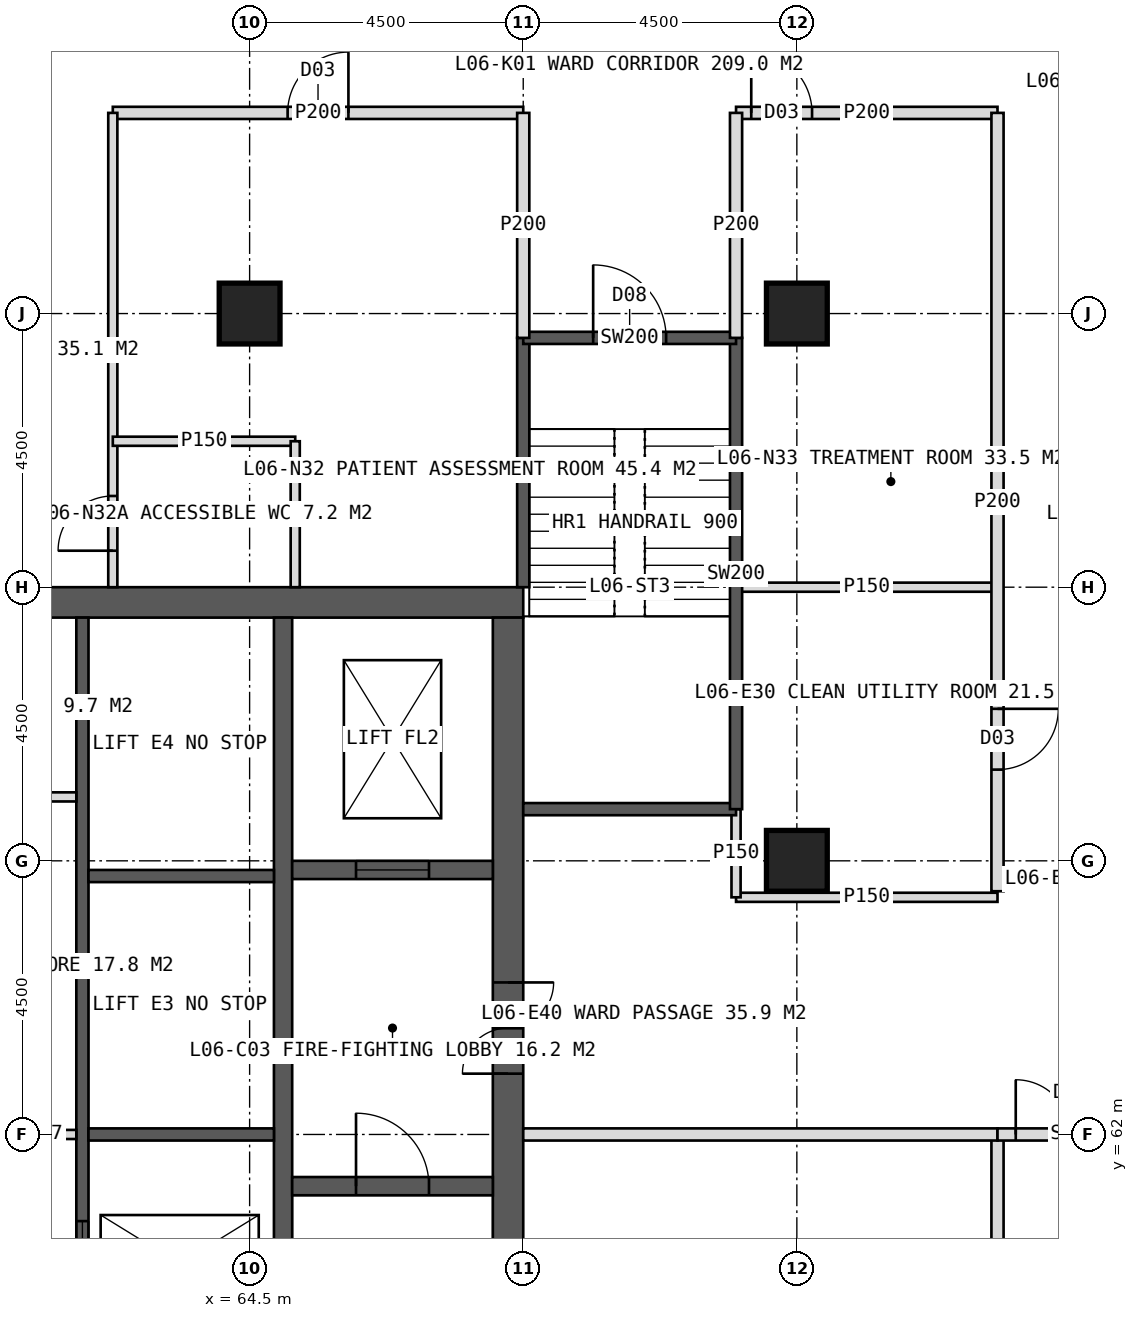
"""IFC4 building model, lengths in metres.
Left out: names, types, materials, properties, quantities, classifications, styles, units other than length and angle.
Written with IfcOpenShell. Run it as: python <this file> out.ifc"""

import sys

from ifc_helpers import new_model, si_unit, direction, frame, frame_2d, origin, origin_2d, place, context, subcontext, project, spatial, rectangle, hollow_rectangle, extrude, element, fill, save


model = new_model("IFC4")
c1 = context("Model", 3, precision=1e-05, world=origin(), true_north=direction((0.0, 1.0)))
c2 = subcontext(c1, "Body", "Model", "MODEL_VIEW")
j1 = project(units=[si_unit("LENGTHUNIT", "METRE"), si_unit("PLANEANGLEUNIT", "RADIAN")], contexts=[c1])
p1 = place(None, origin())
s1 = spatial("IfcSite", under=j1, at=p1, CompositionType="ELEMENT")
p2 = place(p1, origin())
s2 = spatial("IfcBuilding", under=s1, at=p2, CompositionType="ELEMENT")
p3 = place(p2, frame((0.0, 0.0, 31.0)))
s3 = spatial("IfcBuildingStorey", under=s2, at=p3, CompositionType="ELEMENT", Elevation=31.0)
p4 = place(p3, frame((51.0, 70.75, 0.0), z_axis=(0.0, 0.0, 1.0), x_axis=(1.0, 0.0, 0.0)))
e1 = element("IfcWall", 1, at=p4, inside=s3, PredefinedType="SHEAR", context=c2, shape_type="SweptSolid", body=[
    extrude(rectangle(XDim=18.0, YDim=0.5, at=frame_2d((9.0, 0.0))), origin(), (0.0, 0.0, 1.0), 4.0),
])
p5 = place(p4, frame((8.1, 0.0, 0.0)))
e2 = element("IfcOpeningElement", 2, at=p5, cuts=e1, PredefinedType="OPENING", context=c2, shape_type="SweptSolid", body=[
    extrude(rectangle(XDim=1.8, YDim=2.2, at=frame_2d((0.9, 1.1))), frame((0.0, 0.26, 0.0), z_axis=(0.0, -1.0, 0.0), x_axis=(1.0, 0.0, 0.0)), (0.0, 0.0, 1.0), 0.52),
])
p6 = place(p3, frame((68.75, 53.5, 0.0), z_axis=(0.0, 0.0, 1.0), x_axis=(0.0, 1.0, 0.0)))
e3 = element("IfcWall", 3, at=p6, inside=s3, PredefinedType="SHEAR", context=c2, shape_type="SweptSolid", body=[
    extrude(rectangle(XDim=17.0, YDim=0.5, at=frame_2d((8.5, 0.0))), origin(), (0.0, 0.0, 1.0), 4.0),
])
p7 = place(p6, frame((9.5, 0.0, 0.0)))
e4 = element("IfcOpeningElement", 4, at=p7, cuts=e3, PredefinedType="OPENING", context=c2, shape_type="SweptSolid", body=[
    extrude(rectangle(XDim=1.5, YDim=2.2, at=frame_2d((0.75, 1.1))), frame((0.0, 0.26, 0.0), z_axis=(0.0, -1.0, 0.0), x_axis=(1.0, 0.0, 0.0)), (0.0, 0.0, 1.0), 0.52),
])
p8 = place(p3, frame((65.05, 53.5, 0.0), z_axis=(0.0, 0.0, 1.0), x_axis=(0.0, 1.0, 0.0)))
e5 = element("IfcWall", 5, at=p8, inside=s3, PredefinedType="SHEAR", context=c2, shape_type="SweptSolid", body=[
    extrude(rectangle(XDim=17.0, YDim=0.3, at=frame_2d((8.5, 0.0))), origin(), (0.0, 0.0, 1.0), 4.0),
])
p9 = place(p3, frame((61.75, 53.5, 0.0), z_axis=(0.0, 0.0, 1.0), x_axis=(0.0, 1.0, 0.0)))
e6 = element("IfcWall", 6, at=p9, inside=s3, PredefinedType="SHEAR", context=c2, shape_type="SweptSolid", body=[
    extrude(rectangle(XDim=17.0, YDim=0.2, at=frame_2d((8.5, 0.0))), origin(), (0.0, 0.0, 1.0), 4.0),
])
p10 = place(p9, frame((1.375, 0.0, 0.0)))
e7 = element("IfcOpeningElement", 7, at=p10, cuts=e6, PredefinedType="OPENING", context=c2, shape_type="SweptSolid", body=[
    extrude(rectangle(XDim=1.4, YDim=2.2, at=frame_2d((0.7, 1.1))), frame((0.0, 0.11, 0.0), z_axis=(0.0, -1.0, 0.0), x_axis=(1.0, 0.0, 0.0)), (0.0, 0.0, 1.0), 0.22),
])
p11 = place(p9, frame((5.675, 0.0, 0.0)))
e8 = element("IfcOpeningElement", 8, at=p11, cuts=e6, PredefinedType="OPENING", context=c2, shape_type="SweptSolid", body=[
    extrude(rectangle(XDim=1.4, YDim=2.2, at=frame_2d((0.7, 1.1))), frame((0.0, 0.11, 0.0), z_axis=(0.0, -1.0, 0.0), x_axis=(1.0, 0.0, 0.0)), (0.0, 0.0, 1.0), 0.22),
])
for number, where, z_axis, x_axis in (
    (9, (61.85, 62.0, 0.0), (0.0, 0.0, 1.0), (1.0, 0.0, 0.0)),
    (10, (61.85, 66.25, 0.0), (0.0, 0.0, 1.0), (1.0, 0.0, 0.0)),
):
    element("IfcWall", number, at=place(p3, frame(where, z_axis=z_axis, x_axis=x_axis)), inside=s3, PredefinedType="SHEAR", context=c2, shape_type="SweptSolid", body=[
        extrude(rectangle(XDim=3.05, YDim=0.2, at=frame_2d((1.525, 0.0))), origin(), (0.0, 0.0, 1.0), 4.0),
    ])
p12 = place(p3, frame((65.2, 61.15, 0.0), z_axis=(0.0, 0.0, 1.0), x_axis=(1.0, 0.0, 0.0)))
e11 = element("IfcWall", 11, at=p12, inside=s3, PredefinedType="SHEAR", context=c2, shape_type="SweptSolid", body=[
    extrude(rectangle(XDim=3.3, YDim=0.3, at=frame_2d((1.65, 0.0))), origin(), (0.0, 0.0, 1.0), 4.0),
])
p13 = place(p12, frame((1.05, 0.0, 0.0)))
e12 = element("IfcOpeningElement", 12, at=p13, cuts=e11, PredefinedType="OPENING", context=c2, shape_type="SweptSolid", body=[
    extrude(rectangle(XDim=1.2, YDim=2.1, at=frame_2d((0.6, 1.05))), frame((0.0, 0.16, 0.0), z_axis=(0.0, -1.0, 0.0), x_axis=(1.0, 0.0, 0.0)), (0.0, 0.0, 1.0), 0.32),
])
p14 = place(p3, frame((65.2, 66.35, 0.0), z_axis=(0.0, 0.0, 1.0), x_axis=(1.0, 0.0, 0.0)))
e13 = element("IfcWall", 13, at=p14, inside=s3, PredefinedType="SHEAR", context=c2, shape_type="SweptSolid", body=[
    extrude(rectangle(XDim=3.3, YDim=0.3, at=frame_2d((1.65, 0.0))), origin(), (0.0, 0.0, 1.0), 4.0),
])
p15 = place(p14, frame((1.05, 0.0, 0.0)))
e14 = element("IfcOpeningElement", 14, at=p15, cuts=e13, PredefinedType="OPENING", context=c2, shape_type="SweptSolid", body=[
    extrude(rectangle(XDim=1.2, YDim=2.2, at=frame_2d((0.6, 1.1))), frame((0.0, 0.16, 0.0), z_axis=(0.0, -1.0, 0.0), x_axis=(1.0, 0.0, 0.0)), (0.0, 0.0, 1.0), 0.32),
])
for number, where, z_axis, x_axis in (
    (15, (73.5, 75.5, 0.0), (0.0, 0.0, 1.0), (1.0, 0.0, 0.0)),
    (16, (64.5, 75.5, 0.0), (0.0, 0.0, 1.0), (1.0, 0.0, 0.0)),
    (17, (73.5, 66.5, 0.0), (0.0, 0.0, 1.0), (1.0, 0.0, 0.0)),
):
    element("IfcColumn", number, at=place(p3, frame(where, z_axis=z_axis, x_axis=x_axis)), inside=s3, PredefinedType="COLUMN", context=c2, shape_type="SweptSolid", body=[
        extrude(hollow_rectangle(XDim=1.0, YDim=1.0, WallThickness=0.1, at=origin_2d()), origin(), (0.0, 0.0, 1.0), 4.0),
    ])
p16 = place(p3, frame((62.25, 78.8, 0.0), z_axis=(0.0, 0.0, 1.0), x_axis=(1.0, 0.0, 0.0)))
e18 = element("IfcWall", 18, at=p16, inside=s3, PredefinedType="PARTITIONING", context=c2, shape_type="SweptSolid", body=[
    extrude(rectangle(XDim=6.75, YDim=0.2, at=frame_2d((3.375, 0.0))), origin(), (0.0, 0.0, 1.0), 3.75),
])
p17 = place(p16, frame((2.875, 0.0, 0.0)))
e19 = element("IfcOpeningElement", 19, at=p17, cuts=e18, PredefinedType="OPENING", context=c2, shape_type="SweptSolid", body=[
    extrude(rectangle(XDim=1.0, YDim=2.1, at=frame_2d((0.5, 1.05))), frame((0.0, 0.11, 0.0), z_axis=(0.0, -1.0, 0.0), x_axis=(1.0, 0.0, 0.0)), (0.0, 0.0, 1.0), 0.22),
])
p18 = place(p3, frame((72.5, 78.8, 0.0), z_axis=(0.0, 0.0, 1.0), x_axis=(1.0, 0.0, 0.0)))
e20 = element("IfcWall", 20, at=p18, inside=s3, PredefinedType="PARTITIONING", context=c2, shape_type="SweptSolid", body=[
    extrude(rectangle(XDim=4.3, YDim=0.2, at=frame_2d((2.15, 0.0))), origin(), (0.0, 0.0, 1.0), 3.75),
])
p19 = place(p18, frame((0.25, 0.0, 0.0)))
e21 = element("IfcOpeningElement", 21, at=p19, cuts=e20, PredefinedType="OPENING", context=c2, shape_type="SweptSolid", body=[
    extrude(rectangle(XDim=1.0, YDim=2.1, at=frame_2d((0.5, 1.05))), frame((0.0, 0.11, 0.0), z_axis=(0.0, -1.0, 0.0), x_axis=(1.0, 0.0, 0.0)), (0.0, 0.0, 1.0), 0.22),
])
p20 = place(p3, frame((62.25, 71.0, 0.0), z_axis=(0.0, 0.0, 1.0), x_axis=(0.0, 1.0, 0.0)))
e22 = element("IfcWall", 22, at=p20, inside=s3, PredefinedType="PARTITIONING", context=c2, shape_type="SweptSolid", body=[
    extrude(rectangle(XDim=7.8, YDim=0.15, at=frame_2d((3.9, 0.0))), origin(), (0.0, 0.0, 1.0), 3.75),
])
p21 = place(p20, frame((0.6, 0.0, 0.0)))
e23 = element("IfcOpeningElement", 23, at=p21, cuts=e22, PredefinedType="OPENING", context=c2, shape_type="SweptSolid", body=[
    extrude(rectangle(XDim=0.9, YDim=2.1, at=frame_2d((0.45, 1.05))), frame((0.0, 0.085, 0.0), z_axis=(0.0, -1.0, 0.0), x_axis=(1.0, 0.0, 0.0)), (0.0, 0.0, 1.0), 0.17),
])
p22 = place(p3, frame((62.25, 73.4, 0.0), z_axis=(0.0, 0.0, 1.0), x_axis=(1.0, 0.0, 0.0)))
e24 = element("IfcWall", 24, at=p22, inside=s3, PredefinedType="PARTITIONING", context=c2, shape_type="SweptSolid", body=[
    extrude(rectangle(XDim=3.0, YDim=0.15, at=frame_2d((1.5, 0.0))), origin(), (0.0, 0.0, 1.0), 3.75),
])
p23 = place(p3, frame((65.25, 71.0, 0.0), z_axis=(0.0, 0.0, 1.0), x_axis=(0.0, 1.0, 0.0)))
e25 = element("IfcWall", 25, at=p23, inside=s3, PredefinedType="PARTITIONING", context=c2, shape_type="SweptSolid", body=[
    extrude(rectangle(XDim=2.4, YDim=0.15, at=frame_2d((1.2, 0.0))), origin(), (0.0, 0.0, 1.0), 3.75),
])
p24 = place(p3, frame((72.5, 71.0, 0.0), z_axis=(0.0, 0.0, 1.0), x_axis=(1.0, 0.0, 0.0)))
e26 = element("IfcWall", 26, at=p24, inside=s3, PredefinedType="PARTITIONING", context=c2, shape_type="SweptSolid", body=[
    extrude(rectangle(XDim=4.3, YDim=0.15, at=frame_2d((2.15, 0.0))), origin(), (0.0, 0.0, 1.0), 3.75),
])
p25 = place(p3, frame((76.8, 78.8, 0.0), z_axis=(0.0, 0.0, 1.0), x_axis=(0.0, -1.0, 0.0)))
e27 = element("IfcWall", 27, at=p25, inside=s3, PredefinedType="PARTITIONING", context=c2, shape_type="SweptSolid", body=[
    extrude(rectangle(XDim=12.8, YDim=0.2, at=frame_2d((6.4, 0.0))), origin(), (0.0, 0.0, 1.0), 3.75),
])
p26 = place(p25, frame((9.8, 0.0, 0.0)))
e28 = element("IfcOpeningElement", 28, at=p26, cuts=e27, PredefinedType="OPENING", context=c2, shape_type="SweptSolid", body=[
    extrude(rectangle(XDim=1.0, YDim=2.1, at=frame_2d((0.5, 1.05))), frame((0.0, 0.11, 0.0), z_axis=(0.0, -1.0, 0.0), x_axis=(1.0, 0.0, 0.0)), (0.0, 0.0, 1.0), 0.22),
])
p27 = place(p3, frame((76.8, 62.0, 0.0), z_axis=(0.0, 0.0, 1.0), x_axis=(0.0, -1.0, 0.0)))
e29 = element("IfcWall", 29, at=p27, inside=s3, PredefinedType="PARTITIONING", context=c2, shape_type="SweptSolid", body=[
    extrude(rectangle(XDim=16.8, YDim=0.2, at=frame_2d((8.4, 0.0))), origin(), (0.0, 0.0, 1.0), 3.75),
])
p28 = place(p27, frame((4.0, 0.0, 0.0)))
e30 = element("IfcOpeningElement", 30, at=p28, cuts=e29, PredefinedType="OPENING", context=c2, shape_type="SweptSolid", body=[
    extrude(rectangle(XDim=1.0, YDim=2.1, at=frame_2d((0.5, 1.05))), frame((0.0, 0.11, 0.0), z_axis=(0.0, -1.0, 0.0), x_axis=(1.0, 0.0, 0.0)), (0.0, 0.0, 1.0), 0.22),
])
p29 = place(p27, frame((12.4, 0.0, 0.0)))
e31 = element("IfcOpeningElement", 31, at=p29, cuts=e29, PredefinedType="OPENING", context=c2, shape_type="SweptSolid", body=[
    extrude(rectangle(XDim=1.0, YDim=2.1, at=frame_2d((0.5, 1.05))), frame((0.0, 0.11, 0.0), z_axis=(0.0, -1.0, 0.0), x_axis=(1.0, 0.0, 0.0)), (0.0, 0.0, 1.0), 0.22),
])
p30 = place(p3, frame((72.5, 65.9, 0.0), z_axis=(0.0, 0.0, 1.0), x_axis=(1.0, 0.0, 0.0)))
e32 = element("IfcWall", 32, at=p30, inside=s3, PredefinedType="PARTITIONING", context=c2, shape_type="SweptSolid", body=[
    extrude(rectangle(XDim=4.3, YDim=0.15, at=frame_2d((2.15, 0.0))), origin(), (0.0, 0.0, 1.0), 3.75),
])
p31 = place(p3, frame((69.0, 62.0, 0.0), z_axis=(0.0, 0.0, 1.0), x_axis=(1.0, 0.0, 0.0)))
e33 = element("IfcWall", 33, at=p31, inside=s3, PredefinedType="SOLIDWALL", context=c2, shape_type="SweptSolid", body=[
    extrude(rectangle(XDim=7.8, YDim=0.2, at=frame_2d((3.9, 0.0))), origin(), (0.0, 0.0, 1.0), 2.75),
])
p32 = place(p3, frame((76.8, 62.0, 0.0), z_axis=(0.0, 0.0, 1.0), x_axis=(1.0, 0.0, 0.0)))
e34 = element("IfcWall", 34, at=p32, inside=s3, PredefinedType="SOLIDWALL", context=c2, shape_type="SweptSolid", body=[
    extrude(rectangle(XDim=2.7, YDim=0.2, at=frame_2d((1.35, 0.0))), origin(), (0.0, 0.0, 1.0), 2.75),
])
p33 = place(p32, frame((0.3, 0.0, 0.0)))
e35 = element("IfcOpeningElement", 35, at=p33, cuts=e34, PredefinedType="OPENING", context=c2, shape_type="SweptSolid", body=[
    extrude(rectangle(XDim=1.8, YDim=2.2, at=frame_2d((0.9, 1.1))), frame((0.0, 0.11, 0.0), z_axis=(0.0, -1.0, 0.0), x_axis=(1.0, 0.0, 0.0)), (0.0, 0.0, 1.0), 0.22),
])
p34 = place(p3, frame((58.35, 62.0, 0.0), z_axis=(0.0, 0.0, 1.0), x_axis=(1.0, 0.0, 0.0)))
e36 = element("IfcWall", 36, at=p34, inside=s3, PredefinedType="PARTITIONING", context=c2, shape_type="SweptSolid", body=[
    extrude(rectangle(XDim=3.3, YDim=0.15, at=frame_2d((1.65, 0.0))), origin(), (0.0, 0.0, 1.0), 3.75),
])
p35 = place(p34, frame((1.15, 0.0, 0.0)))
e37 = element("IfcOpeningElement", 37, at=p35, cuts=e36, PredefinedType="OPENING", context=c2, shape_type="SweptSolid", body=[
    extrude(rectangle(XDim=1.0, YDim=2.1, at=frame_2d((0.5, 1.05))), frame((0.0, 0.085, 0.0), z_axis=(0.0, -1.0, 0.0), x_axis=(1.0, 0.0, 0.0)), (0.0, 0.0, 1.0), 0.17),
])
p36 = place(p3, frame((58.35, 67.551, 0.0), z_axis=(0.0, 0.0, 1.0), x_axis=(1.0, 0.0, 0.0)))
e38 = element("IfcWall", 38, at=p36, inside=s3, PredefinedType="PARTITIONING", context=c2, shape_type="SweptSolid", body=[
    extrude(rectangle(XDim=3.3, YDim=0.15, at=frame_2d((1.65, 0.0))), origin(), (0.0, 0.0, 1.0), 3.75),
])
p37 = place(p3, frame((72.5, 65.9, 0.0), z_axis=(0.0, 0.0, 1.0), x_axis=(0.0, 1.0, 0.0)))
e39 = element("IfcWall", 39, at=p37, inside=s3, PredefinedType="PARTITIONING", context=c2, shape_type="SweptSolid", body=[
    extrude(rectangle(XDim=1.45, YDim=0.15, at=frame_2d((0.725, 0.0))), origin(), (0.0, 0.0, 1.0), 3.75),
])
p38 = place(p3, frame((69.0, 71.0, 0.0), z_axis=(0.0, 0.0, 1.0), x_axis=(0.0, 1.0, 0.0)))
e40 = element("IfcWall", 40, at=p38, inside=s3, PredefinedType="SOLIDWALL", context=c2, shape_type="SweptSolid", body=[
    extrude(rectangle(XDim=4.1, YDim=0.2, at=frame_2d((2.05, 0.0))), origin(), (0.0, 0.0, 1.0), 3.75),
])
p39 = place(p3, frame((69.0, 67.35, 0.0), z_axis=(0.0, 0.0, 1.0), x_axis=(1.0, 0.0, 0.0)))
e41 = element("IfcWall", 41, at=p39, inside=s3, PredefinedType="SOLIDWALL", context=c2, shape_type="SweptSolid", body=[
    extrude(rectangle(XDim=3.5, YDim=0.2, at=frame_2d((1.75, 0.0))), origin(), (0.0, 0.0, 1.0), 3.75),
])
p40 = place(p3, frame((72.5, 67.35, 0.0), z_axis=(0.0, 0.0, 1.0), x_axis=(0.0, 1.0, 0.0)))
e42 = element("IfcWall", 42, at=p40, inside=s3, PredefinedType="SOLIDWALL", context=c2, shape_type="SweptSolid", body=[
    extrude(rectangle(XDim=7.75, YDim=0.2, at=frame_2d((3.875, 0.0))), origin(), (0.0, 0.0, 1.0), 3.75),
])
p41 = place(p3, frame((69.0, 75.1, 0.0), z_axis=(0.0, 0.0, 1.0), x_axis=(1.0, 0.0, 0.0)))
e43 = element("IfcWall", 43, at=p41, inside=s3, PredefinedType="SOLIDWALL", context=c2, shape_type="SweptSolid", body=[
    extrude(rectangle(XDim=3.5, YDim=0.2, at=frame_2d((1.75, 0.0))), origin(), (0.0, 0.0, 1.0), 3.75),
])
p42 = place(p41, frame((1.15, 0.0, 0.0)))
e44 = element("IfcOpeningElement", 44, at=p42, cuts=e43, PredefinedType="OPENING", context=c2, shape_type="SweptSolid", body=[
    extrude(rectangle(XDim=1.2, YDim=2.1, at=frame_2d((0.6, 1.05))), frame((0.0, 0.11, 0.0), z_axis=(0.0, -1.0, 0.0), x_axis=(1.0, 0.0, 0.0)), (0.0, 0.0, 1.0), 0.22),
])
for number, where, z_axis, x_axis in (
    (45, (69.0, 75.1, 0.0), (0.0, 0.0, 1.0), (0.0, 1.0, 0.0)),
    (46, (72.5, 75.1, 0.0), (0.0, 0.0, 1.0), (0.0, 1.0, 0.0)),
):
    element("IfcWall", number, at=place(p3, frame(where, z_axis=z_axis, x_axis=x_axis)), inside=s3, PredefinedType="PARTITIONING", context=c2, shape_type="SweptSolid", body=[
        extrude(rectangle(XDim=3.7, YDim=0.2, at=frame_2d((1.85, 0.0))), origin(), (0.0, 0.0, 1.0), 3.75),
    ])
p43 = place(p21, origin())
e47 = element("IfcDoor", 47, at=p43, inside=s3, OperationType="SINGLE_SWING_LEFT", PredefinedType="DOOR", context=c2, shape_type="SweptSolid", body=[
    extrude(rectangle(XDim=0.9, YDim=2.1, at=frame_2d((0.45, 1.05))), frame((0.0, 0.025, 0.0), z_axis=(0.0, -1.0, 0.0), x_axis=(1.0, 0.0, 0.0)), (0.0, 0.0, 1.0), 0.05),
])
fill(e23, e47)
p44 = place(p17, origin())
e48 = element("IfcDoor", 48, at=p44, inside=s3, OperationType="SINGLE_SWING_RIGHT", PredefinedType="DOOR", context=c2, shape_type="SweptSolid", body=[
    extrude(rectangle(XDim=1.0, YDim=2.1, at=frame_2d((0.5, 1.05))), frame((0.0, 0.025, 0.0), z_axis=(0.0, -1.0, 0.0), x_axis=(1.0, 0.0, 0.0)), (0.0, 0.0, 1.0), 0.05),
])
fill(e19, e48)
p45 = place(p19, origin())
e49 = element("IfcDoor", 49, at=p45, inside=s3, OperationType="SINGLE_SWING_LEFT", PredefinedType="DOOR", context=c2, shape_type="SweptSolid", body=[
    extrude(rectangle(XDim=1.0, YDim=2.1, at=frame_2d((0.5, 1.05))), frame((0.0, 0.025, 0.0), z_axis=(0.0, -1.0, 0.0), x_axis=(1.0, 0.0, 0.0)), (0.0, 0.0, 1.0), 0.05),
])
fill(e21, e49)
p46 = place(p26, origin())
e50 = element("IfcDoor", 50, at=p46, inside=s3, OperationType="SINGLE_SWING_LEFT", PredefinedType="DOOR", context=c2, shape_type="SweptSolid", body=[
    extrude(rectangle(XDim=1.0, YDim=2.1, at=frame_2d((0.5, 1.05))), frame((0.0, 0.025, 0.0), z_axis=(0.0, -1.0, 0.0), x_axis=(1.0, 0.0, 0.0)), (0.0, 0.0, 1.0), 0.05),
])
fill(e28, e50)
p47 = place(p33, origin())
e51 = element("IfcDoor", 51, at=p47, inside=s3, OperationType="DOUBLE_DOOR_DOUBLE_SWING", PredefinedType="DOOR", context=c2, shape_type="SweptSolid", body=[
    extrude(rectangle(XDim=1.8, YDim=2.2, at=frame_2d((0.9, 1.1))), frame((0.0, 0.025, 0.0), z_axis=(0.0, -1.0, 0.0), x_axis=(1.0, 0.0, 0.0)), (0.0, 0.0, 1.0), 0.05),
])
fill(e35, e51)
p48 = place(p7, origin())
e52 = element("IfcDoor", 52, at=p48, inside=s3, OperationType="DOUBLE_DOOR_SINGLE_SWING", PredefinedType="DOOR", context=c2, shape_type="SweptSolid", body=[
    extrude(rectangle(XDim=1.5, YDim=2.2, at=frame_2d((0.75, 1.1))), frame((0.0, 0.025, 0.0), z_axis=(0.0, -1.0, 0.0), x_axis=(1.0, 0.0, 0.0)), (0.0, 0.0, 1.0), 0.05),
])
fill(e4, e52)
p49 = place(p13, origin())
e53 = element("IfcDoor", 53, at=p49, inside=s3, OperationType="SINGLE_SWING_LEFT", PredefinedType="DOOR", context=c2, shape_type="SweptSolid", body=[
    extrude(rectangle(XDim=1.2, YDim=2.1, at=frame_2d((0.6, 1.05))), frame((0.0, 0.025, 0.0), z_axis=(0.0, -1.0, 0.0), x_axis=(1.0, 0.0, 0.0)), (0.0, 0.0, 1.0), 0.05),
])
fill(e12, e53)
p50 = place(p15, origin())
e54 = element("IfcDoor", 54, at=p50, inside=s3, OperationType="SLIDING_TO_LEFT", PredefinedType="DOOR", context=c2, shape_type="SweptSolid", body=[
    extrude(rectangle(XDim=1.2, YDim=2.2, at=frame_2d((0.6, 1.1))), frame((0.0, 0.025, 0.0), z_axis=(0.0, -1.0, 0.0), x_axis=(1.0, 0.0, 0.0)), (0.0, 0.0, 1.0), 0.05),
])
fill(e14, e54)
p51 = place(p11, origin())
e55 = element("IfcDoor", 55, at=p51, inside=s3, OperationType="SLIDING_TO_LEFT", PredefinedType="DOOR", context=c2, shape_type="SweptSolid", body=[
    extrude(rectangle(XDim=1.4, YDim=2.2, at=frame_2d((0.7, 1.1))), frame((0.0, 0.025, 0.0), z_axis=(0.0, -1.0, 0.0), x_axis=(1.0, 0.0, 0.0)), (0.0, 0.0, 1.0), 0.05),
])
fill(e8, e55)
p52 = place(p42, origin())
e56 = element("IfcDoor", 56, at=p52, inside=s3, OperationType="SINGLE_SWING_LEFT", PredefinedType="DOOR", context=c2, shape_type="SweptSolid", body=[
    extrude(rectangle(XDim=1.2, YDim=2.1, at=frame_2d((0.6, 1.05))), frame((0.0, 0.025, 0.0), z_axis=(0.0, -1.0, 0.0), x_axis=(1.0, 0.0, 0.0)), (0.0, 0.0, 1.0), 0.05),
])
fill(e44, e56)
save(model, sys.argv[1])
